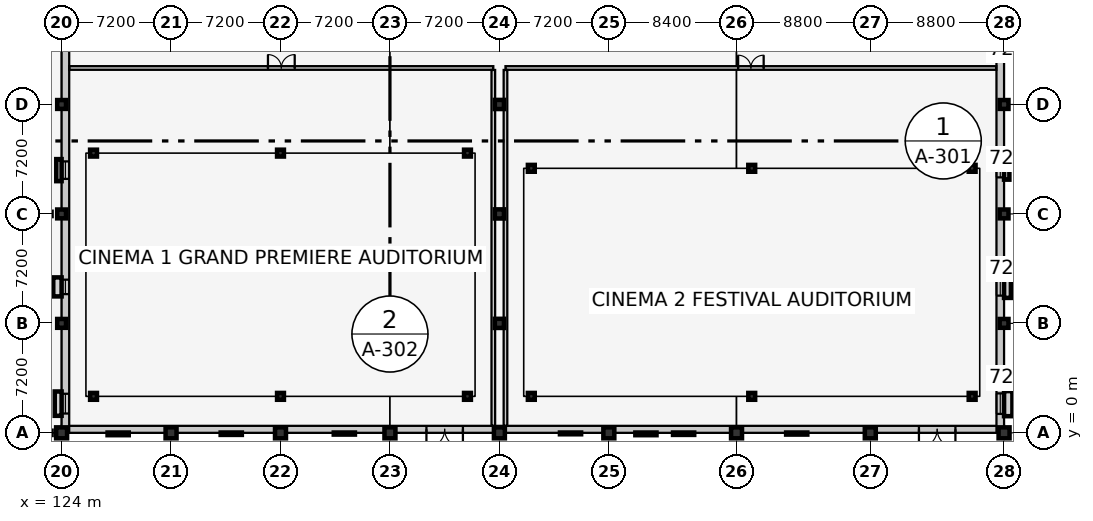
"""IFC4 building model, lengths in metres.
Left out: names, types, materials, properties, quantities, classifications, styles, units other than length and angle.
Written with IfcOpenShell. Run it as: python <this file> out.ifc"""

import sys

from ifc_helpers import new_model, si_unit, direction, frame, frame_2d, origin, origin_2d, place, context, subcontext, project, spatial, rectangle, extrude, element, fill, save


model = new_model("IFC4")
c1 = context("Model", 3, precision=1e-05, world=origin(), true_north=direction((0.0, 1.0)))
c2 = subcontext(c1, "Body", "Model", "MODEL_VIEW")
j1 = project(units=[si_unit("LENGTHUNIT", "METRE"), si_unit("PLANEANGLEUNIT", "RADIAN")], contexts=[c1])
p1 = place(None, origin())
s1 = spatial("IfcSite", under=j1, at=p1, CompositionType="ELEMENT")
p2 = place(p1, origin())
s2 = spatial("IfcBuilding", under=s1, at=p2, CompositionType="ELEMENT")
p3 = place(p2, origin())
s3 = spatial("IfcBuildingStorey", under=s2, at=p3, CompositionType="ELEMENT", Elevation=0.0)
p4 = place(p3, frame((124.0, 0.0, 0.0), z_axis=(0.0, 0.0, 1.0), x_axis=(1.0, 0.0, 0.0)))
e1 = element("IfcColumn", 1, at=p4, inside=s3, PredefinedType="COLUMN", context=c2, shape_type="SweptSolid", body=[
    extrude(rectangle(XDim=0.72, YDim=0.72, at=origin_2d()), origin(), (0.0, 0.0, 1.0), 5.4),
])
for number, where, z_axis, x_axis in (
    (2, (124.0, 7.2, 0.0), (0.0, 0.0, 1.0), (1.0, 0.0, 0.0)),
    (3, (124.0, 14.4, 0.0), (0.0, 0.0, 1.0), (1.0, 0.0, 0.0)),
    (4, (124.0, 21.6, 0.0), (0.0, 0.0, 1.0), (1.0, 0.0, 0.0)),
):
    element("IfcColumn", number, at=place(p3, frame(where, z_axis=z_axis, x_axis=x_axis)), inside=s3, PredefinedType="COLUMN", context=c2, shape_type="SweptSolid", body=[
        extrude(rectangle(XDim=0.58, YDim=0.58, at=origin_2d()), origin(), (0.0, 0.0, 1.0), 5.4),
    ])
for number, where, z_axis, x_axis in (
    (5, (131.2, 0.0, 0.0), (0.0, 0.0, 1.0), (1.0, 0.0, 0.0)),
    (6, (138.4, 0.0, 0.0), (0.0, 0.0, 1.0), (1.0, 0.0, 0.0)),
    (7, (145.6, 0.0, 0.0), (0.0, 0.0, 1.0), (1.0, 0.0, 0.0)),
    (8, (152.8, 0.0, 0.0), (0.0, 0.0, 1.0), (1.0, 0.0, 0.0)),
):
    element("IfcColumn", number, at=place(p3, frame(where, z_axis=z_axis, x_axis=x_axis)), inside=s3, PredefinedType="COLUMN", context=c2, shape_type="SweptSolid", body=[
        extrude(rectangle(XDim=0.72, YDim=0.72, at=origin_2d()), origin(), (0.0, 0.0, 1.0), 5.4),
    ])
for number, where, z_axis, x_axis in (
    (9, (152.8, 7.2, 0.0), (0.0, 0.0, 1.0), (1.0, 0.0, 0.0)),
    (10, (152.8, 14.4, 0.0), (0.0, 0.0, 1.0), (1.0, 0.0, 0.0)),
    (11, (152.8, 21.6, 0.0), (0.0, 0.0, 1.0), (1.0, 0.0, 0.0)),
):
    element("IfcColumn", number, at=place(p3, frame(where, z_axis=z_axis, x_axis=x_axis)), inside=s3, PredefinedType="COLUMN", context=c2, shape_type="SweptSolid", body=[
        extrude(rectangle(XDim=0.6, YDim=0.6, at=origin_2d()), origin(), (0.0, 0.0, 1.0), 5.4),
    ])
for number, where, z_axis, x_axis in (
    (12, (160.0, 0.0, 0.0), (0.0, 0.0, 1.0), (1.0, 0.0, 0.0)),
    (13, (168.4, 0.0, 0.0), (0.0, 0.0, 1.0), (1.0, 0.0, 0.0)),
    (14, (177.2, 0.0, 0.0), (0.0, 0.0, 1.0), (1.0, 0.0, 0.0)),
    (15, (186.0, 0.0, 0.0), (0.0, 0.0, 1.0), (1.0, 0.0, 0.0)),
):
    element("IfcColumn", number, at=place(p3, frame(where, z_axis=z_axis, x_axis=x_axis)), inside=s3, PredefinedType="COLUMN", context=c2, shape_type="SweptSolid", body=[
        extrude(rectangle(XDim=0.72, YDim=0.72, at=origin_2d()), origin(), (0.0, 0.0, 1.0), 5.4),
    ])
for number, where, z_axis, x_axis in (
    (16, (186.0, 7.2, 0.0), (0.0, 0.0, 1.0), (1.0, 0.0, 0.0)),
    (17, (186.0, 14.4, 0.0), (0.0, 0.0, 1.0), (1.0, 0.0, 0.0)),
    (18, (186.0, 21.6, 0.0), (0.0, 0.0, 1.0), (1.0, 0.0, 0.0)),
):
    element("IfcColumn", number, at=place(p3, frame(where, z_axis=z_axis, x_axis=x_axis)), inside=s3, PredefinedType="COLUMN", context=c2, shape_type="SweptSolid", body=[
        extrude(rectangle(XDim=0.58, YDim=0.58, at=origin_2d()), origin(), (0.0, 0.0, 1.0), 5.4),
    ])
p5 = place(p3, frame((126.1, 2.4, -0.55), z_axis=(0.0, 0.0, 1.0), x_axis=(1.0, 0.0, 0.0)))
e19 = element("IfcColumn", 19, at=p5, inside=s3, PredefinedType="COLUMN", context=c2, shape_type="SweptSolid", body=[
    extrude(rectangle(XDim=0.45, YDim=0.45, at=origin_2d()), origin(), (0.0, 0.0, 1.0), 0.925),
])
p6 = place(p3, frame((126.1, 18.4, -0.55), z_axis=(0.0, 0.0, 1.0), x_axis=(1.0, 0.0, 0.0)))
e20 = element("IfcColumn", 20, at=p6, inside=s3, PredefinedType="COLUMN", context=c2, shape_type="SweptSolid", body=[
    extrude(rectangle(XDim=0.45, YDim=0.45, at=origin_2d()), origin(), (0.0, 0.0, 1.0), 4.195),
])
p7 = place(p3, frame((138.4, 2.4, -0.55), z_axis=(0.0, 0.0, 1.0), x_axis=(1.0, 0.0, 0.0)))
e21 = element("IfcColumn", 21, at=p7, inside=s3, PredefinedType="COLUMN", context=c2, shape_type="SweptSolid", body=[
    extrude(rectangle(XDim=0.45, YDim=0.45, at=origin_2d()), origin(), (0.0, 0.0, 1.0), 0.925),
])
p8 = place(p3, frame((138.4, 18.4, -0.55), z_axis=(0.0, 0.0, 1.0), x_axis=(1.0, 0.0, 0.0)))
e22 = element("IfcColumn", 22, at=p8, inside=s3, PredefinedType="COLUMN", context=c2, shape_type="SweptSolid", body=[
    extrude(rectangle(XDim=0.45, YDim=0.45, at=origin_2d()), origin(), (0.0, 0.0, 1.0), 4.195),
])
p9 = place(p3, frame((150.7, 2.4, -0.55), z_axis=(0.0, 0.0, 1.0), x_axis=(1.0, 0.0, 0.0)))
e23 = element("IfcColumn", 23, at=p9, inside=s3, PredefinedType="COLUMN", context=c2, shape_type="SweptSolid", body=[
    extrude(rectangle(XDim=0.45, YDim=0.45, at=origin_2d()), origin(), (0.0, 0.0, 1.0), 0.925),
])
p10 = place(p3, frame((150.7, 18.4, -0.55), z_axis=(0.0, 0.0, 1.0), x_axis=(1.0, 0.0, 0.0)))
e24 = element("IfcColumn", 24, at=p10, inside=s3, PredefinedType="COLUMN", context=c2, shape_type="SweptSolid", body=[
    extrude(rectangle(XDim=0.45, YDim=0.45, at=origin_2d()), origin(), (0.0, 0.0, 1.0), 4.195),
])
p11 = place(p3, frame((154.9, 2.4, -0.55), z_axis=(0.0, 0.0, 1.0), x_axis=(1.0, 0.0, 0.0)))
e25 = element("IfcColumn", 25, at=p11, inside=s3, PredefinedType="COLUMN", context=c2, shape_type="SweptSolid", body=[
    extrude(rectangle(XDim=0.45, YDim=0.45, at=origin_2d()), origin(), (0.0, 0.0, 1.0), 0.945),
])
p12 = place(p3, frame((154.9, 17.4, -0.55), z_axis=(0.0, 0.0, 1.0), x_axis=(1.0, 0.0, 0.0)))
e26 = element("IfcColumn", 26, at=p12, inside=s3, PredefinedType="COLUMN", context=c2, shape_type="SweptSolid", body=[
    extrude(rectangle(XDim=0.45, YDim=0.45, at=origin_2d()), origin(), (0.0, 0.0, 1.0), 4.015),
])
p13 = place(p3, frame((169.4, 2.4, -0.55), z_axis=(0.0, 0.0, 1.0), x_axis=(1.0, 0.0, 0.0)))
e27 = element("IfcColumn", 27, at=p13, inside=s3, PredefinedType="COLUMN", context=c2, shape_type="SweptSolid", body=[
    extrude(rectangle(XDim=0.45, YDim=0.45, at=origin_2d()), origin(), (0.0, 0.0, 1.0), 0.945),
])
p14 = place(p3, frame((169.4, 17.4, -0.55), z_axis=(0.0, 0.0, 1.0), x_axis=(1.0, 0.0, 0.0)))
e28 = element("IfcColumn", 28, at=p14, inside=s3, PredefinedType="COLUMN", context=c2, shape_type="SweptSolid", body=[
    extrude(rectangle(XDim=0.45, YDim=0.45, at=origin_2d()), origin(), (0.0, 0.0, 1.0), 4.015),
])
p15 = place(p3, frame((183.9, 2.4, -0.55), z_axis=(0.0, 0.0, 1.0), x_axis=(1.0, 0.0, 0.0)))
e29 = element("IfcColumn", 29, at=p15, inside=s3, PredefinedType="COLUMN", context=c2, shape_type="SweptSolid", body=[
    extrude(rectangle(XDim=0.45, YDim=0.45, at=origin_2d()), origin(), (0.0, 0.0, 1.0), 0.945),
])
p16 = place(p3, frame((183.9, 17.4, -0.55), z_axis=(0.0, 0.0, 1.0), x_axis=(1.0, 0.0, 0.0)))
e30 = element("IfcColumn", 30, at=p16, inside=s3, PredefinedType="COLUMN", context=c2, shape_type="SweptSolid", body=[
    extrude(rectangle(XDim=0.45, YDim=0.45, at=origin_2d()), origin(), (0.0, 0.0, 1.0), 4.015),
])
p17 = place(p3, frame((186.0, 0.23, 0.0), z_axis=(0.0, 0.0, 1.0), x_axis=(-1.0, 0.0, 0.0)))
e31 = element("IfcWall", 31, at=p17, inside=s3, PredefinedType="SOLIDWALL", context=c2, shape_type="SweptSolid", body=[
    extrude(rectangle(XDim=62.0, YDim=0.46, at=frame_2d((31.0, 0.0))), origin(), (0.0, 0.0, 1.0), 5.4),
])
p18 = place(p17, frame((35.6, 0.0, 0.0)))
e32 = element("IfcOpeningElement", 32, at=p18, cuts=e31, PredefinedType="OPENING", context=c2, shape_type="SweptSolid", body=[
    extrude(rectangle(XDim=2.4, YDim=2.4, at=frame_2d((1.2, 1.2))), frame((0.0, 0.242, 0.0), z_axis=(0.0, -1.0, 0.0), x_axis=(1.0, 0.0, 0.0)), (0.0, 0.0, 1.0), 0.484),
])
p19 = place(p17, frame((3.2, 0.0, 0.0)))
e33 = element("IfcOpeningElement", 33, at=p19, cuts=e31, PredefinedType="OPENING", context=c2, shape_type="SweptSolid", body=[
    extrude(rectangle(XDim=2.4, YDim=2.4, at=frame_2d((1.2, 1.2))), frame((0.0, 0.242, 0.0), z_axis=(0.0, -1.0, 0.0), x_axis=(1.0, 0.0, 0.0)), (0.0, 0.0, 1.0), 0.484),
])
p20 = place(p3, frame((185.75, 38.4, 0.0), z_axis=(0.0, 0.0, 1.0), x_axis=(0.0, -1.0, 0.0)))
e34 = element("IfcWall", 34, at=p20, inside=s3, PredefinedType="SOLIDWALL", context=c2, shape_type="SweptSolid", body=[
    extrude(rectangle(XDim=38.4, YDim=0.5, at=frame_2d((19.2, 0.0))), origin(), (0.0, 0.0, 1.0), 4.275),
])
p21 = place(p20, frame((1.42, 0.0, 0.9)))
e35 = element("IfcOpeningElement", 35, at=p21, cuts=e34, PredefinedType="OPENING", context=c2, shape_type="SweptSolid", body=[
    extrude(rectangle(XDim=1.0, YDim=1.35, at=frame_2d((0.5, 0.675))), frame((0.0, 0.262, 0.0), z_axis=(0.0, -1.0, 0.0), x_axis=(1.0, 0.0, 0.0)), (0.0, 0.0, 1.0), 0.524),
])
p22 = place(p20, frame((5.21, 0.0, 0.9)))
e36 = element("IfcOpeningElement", 36, at=p22, cuts=e34, PredefinedType="OPENING", context=c2, shape_type="SweptSolid", body=[
    extrude(rectangle(XDim=1.1, YDim=1.35, at=frame_2d((0.55, 0.675))), frame((0.0, 0.262, 0.0), z_axis=(0.0, -1.0, 0.0), x_axis=(1.0, 0.0, 0.0)), (0.0, 0.0, 1.0), 0.524),
])
p23 = place(p20, frame((20.645, 0.0, 0.9)))
e37 = element("IfcOpeningElement", 37, at=p23, cuts=e34, PredefinedType="OPENING", context=c2, shape_type="SweptSolid", body=[
    extrude(rectangle(XDim=0.95, YDim=1.45, at=frame_2d((0.475, 0.725))), frame((0.0, 0.262, 0.0), z_axis=(0.0, -1.0, 0.0), x_axis=(1.0, 0.0, 0.0)), (0.0, 0.0, 1.0), 0.524),
])
p24 = place(p20, frame((28.225, 0.0, 0.9)))
e38 = element("IfcOpeningElement", 38, at=p24, cuts=e34, PredefinedType="OPENING", context=c2, shape_type="SweptSolid", body=[
    extrude(rectangle(XDim=1.15, YDim=1.45, at=frame_2d((0.575, 0.725))), frame((0.0, 0.262, 0.0), z_axis=(0.0, -1.0, 0.0), x_axis=(1.0, 0.0, 0.0)), (0.0, 0.0, 1.0), 0.524),
])
p25 = place(p20, frame((35.805, 0.0, 0.9)))
e39 = element("IfcOpeningElement", 39, at=p25, cuts=e34, PredefinedType="OPENING", context=c2, shape_type="SweptSolid", body=[
    extrude(rectangle(XDim=1.35, YDim=1.45, at=frame_2d((0.675, 0.725))), frame((0.0, 0.262, 0.0), z_axis=(0.0, -1.0, 0.0), x_axis=(1.0, 0.0, 0.0)), (0.0, 0.0, 1.0), 0.524),
])
p26 = place(p3, frame((124.25, 0.0, 0.0), z_axis=(0.0, 0.0, 1.0), x_axis=(0.0, 1.0, 0.0)))
e40 = element("IfcWall", 40, at=p26, inside=s3, PredefinedType="SOLIDWALL", context=c2, shape_type="SweptSolid", body=[
    extrude(rectangle(XDim=38.4, YDim=0.5, at=frame_2d((19.2, 0.0))), origin(), (0.0, 0.0, 1.0), 4.275),
])
p27 = place(p26, frame((25.3, 0.0, 0.0)))
e41 = element("IfcOpeningElement", 41, at=p27, cuts=e40, PredefinedType="OPENING", context=c2, shape_type="SweptSolid", body=[
    extrude(rectangle(XDim=2.2, YDim=2.4, at=frame_2d((1.1, 1.2))), frame((0.0, 0.262, 0.0), z_axis=(0.0, -1.0, 0.0), x_axis=(1.0, 0.0, 0.0)), (0.0, 0.0, 1.0), 0.524),
])
p28 = place(p26, frame((1.27, 0.0, 0.9)))
e42 = element("IfcOpeningElement", 42, at=p28, cuts=e40, PredefinedType="OPENING", context=c2, shape_type="SweptSolid", body=[
    extrude(rectangle(XDim=1.3, YDim=1.35, at=frame_2d((0.65, 0.675))), frame((0.0, 0.262, 0.0), z_axis=(0.0, -1.0, 0.0), x_axis=(1.0, 0.0, 0.0)), (0.0, 0.0, 1.0), 0.524),
])
p29 = place(p26, frame((9.125, 0.0, 0.9)))
e43 = element("IfcOpeningElement", 43, at=p29, cuts=e40, PredefinedType="OPENING", context=c2, shape_type="SweptSolid", body=[
    extrude(rectangle(XDim=0.95, YDim=1.45, at=frame_2d((0.475, 0.725))), frame((0.0, 0.262, 0.0), z_axis=(0.0, -1.0, 0.0), x_axis=(1.0, 0.0, 0.0)), (0.0, 0.0, 1.0), 0.524),
])
p30 = place(p26, frame((16.705, 0.0, 0.9)))
e44 = element("IfcOpeningElement", 44, at=p30, cuts=e40, PredefinedType="OPENING", context=c2, shape_type="SweptSolid", body=[
    extrude(rectangle(XDim=1.15, YDim=1.45, at=frame_2d((0.575, 0.725))), frame((0.0, 0.262, 0.0), z_axis=(0.0, -1.0, 0.0), x_axis=(1.0, 0.0, 0.0)), (0.0, 0.0, 1.0), 0.524),
])
p31 = place(p26, frame((32.19, 0.0, 0.9)))
e45 = element("IfcOpeningElement", 45, at=p31, cuts=e40, PredefinedType="OPENING", context=c2, shape_type="SweptSolid", body=[
    extrude(rectangle(XDim=0.9, YDim=1.6, at=frame_2d((0.45, 0.8))), frame((0.0, 0.262, 0.0), z_axis=(0.0, -1.0, 0.0), x_axis=(1.0, 0.0, 0.0)), (0.0, 0.0, 1.0), 0.524),
])
p32 = place(p26, frame((35.955, 0.0, 0.9)))
e46 = element("IfcOpeningElement", 46, at=p32, cuts=e40, PredefinedType="OPENING", context=c2, shape_type="SweptSolid", body=[
    extrude(rectangle(XDim=1.05, YDim=1.6, at=frame_2d((0.525, 0.8))), frame((0.0, 0.262, 0.0), z_axis=(0.0, -1.0, 0.0), x_axis=(1.0, 0.0, 0.0)), (0.0, 0.0, 1.0), 0.524),
])
p33 = place(p3, frame((124.51, 24.0, 0.0), z_axis=(0.0, 0.0, 1.0), x_axis=(1.0, 0.0, 0.0)))
e47 = element("IfcWall", 47, at=p33, inside=s3, PredefinedType="PARTITIONING", context=c2, shape_type="SweptSolid", body=[
    extrude(rectangle(XDim=27.89, YDim=0.24, at=frame_2d((13.945, 0.0))), origin(), (0.0, 0.0, 1.0), 5.15),
])
p34 = place(p33, frame((13.065, 0.0, 0.0)))
e48 = element("IfcOpeningElement", 48, at=p34, cuts=e47, PredefinedType="OPENING", context=c2, shape_type="SweptSolid", body=[
    extrude(rectangle(XDim=1.76, YDim=2.3, at=frame_2d((0.88, 1.15))), frame((0.0, 0.132, 0.0), z_axis=(0.0, -1.0, 0.0), x_axis=(1.0, 0.0, 0.0)), (0.0, 0.0, 1.0), 0.264),
])
p35 = place(p3, frame((152.4, 0.47, 0.0), z_axis=(0.0, 0.0, 1.0), x_axis=(0.0, 1.0, 0.0)))
e49 = element("IfcWall", 49, at=p35, inside=s3, PredefinedType="PARTITIONING", context=c2, shape_type="SweptSolid", body=[
    extrude(rectangle(XDim=23.4, YDim=0.24, at=frame_2d((11.7, 0.0))), origin(), (0.0, 0.0, 1.0), 5.15),
])
p36 = place(p3, frame((153.2, 24.0, 0.0), z_axis=(0.0, 0.0, 1.0), x_axis=(1.0, 0.0, 0.0)))
e50 = element("IfcWall", 50, at=p36, inside=s3, PredefinedType="PARTITIONING", context=c2, shape_type="SweptSolid", body=[
    extrude(rectangle(XDim=32.29, YDim=0.24, at=frame_2d((16.145, 0.0))), origin(), (0.0, 0.0, 1.0), 5.15),
])
p37 = place(p36, frame((15.305, 0.0, 0.0)))
e51 = element("IfcOpeningElement", 51, at=p37, cuts=e50, PredefinedType="OPENING", context=c2, shape_type="SweptSolid", body=[
    extrude(rectangle(XDim=1.68, YDim=2.3, at=frame_2d((0.84, 1.15))), frame((0.0, 0.132, 0.0), z_axis=(0.0, -1.0, 0.0), x_axis=(1.0, 0.0, 0.0)), (0.0, 0.0, 1.0), 0.264),
])
p38 = place(p3, frame((153.2, 0.47, 0.0), z_axis=(0.0, 0.0, 1.0), x_axis=(0.0, 1.0, 0.0)))
e52 = element("IfcWall", 52, at=p38, inside=s3, PredefinedType="PARTITIONING", context=c2, shape_type="SweptSolid", body=[
    extrude(rectangle(XDim=23.4, YDim=0.24, at=frame_2d((11.7, 0.0))), origin(), (0.0, 0.0, 1.0), 5.15),
])
p39 = place(p18, origin())
e53 = element("IfcDoor", 53, at=p39, inside=s3, OperationType="DOUBLE_DOOR_SINGLE_SWING", PredefinedType="DOOR", context=c2, shape_type="SweptSolid", body=[
    extrude(rectangle(XDim=2.4, YDim=2.4, at=frame_2d((1.2, 1.2))), frame((0.0, 0.025, 0.0), z_axis=(0.0, -1.0, 0.0), x_axis=(1.0, 0.0, 0.0)), (0.0, 0.0, 1.0), 0.05),
])
fill(e32, e53)
p40 = place(p19, origin())
e54 = element("IfcDoor", 54, at=p40, inside=s3, OperationType="DOUBLE_DOOR_SINGLE_SWING", PredefinedType="DOOR", context=c2, shape_type="SweptSolid", body=[
    extrude(rectangle(XDim=2.4, YDim=2.4, at=frame_2d((1.2, 1.2))), frame((0.0, 0.025, 0.0), z_axis=(0.0, -1.0, 0.0), x_axis=(1.0, 0.0, 0.0)), (0.0, 0.0, 1.0), 0.05),
])
fill(e33, e54)
p41 = place(p23, origin())
e55 = element("IfcWindow", 55, at=p41, inside=s3, PartitioningType="SINGLE_PANEL", PredefinedType="WINDOW", context=c2, shape_type="SweptSolid", body=[
    extrude(rectangle(XDim=0.95, YDim=1.45, at=frame_2d((0.475, 0.725))), frame((0.0, 0.03, 0.0), z_axis=(0.0, -1.0, 0.0), x_axis=(1.0, 0.0, 0.0)), (0.0, 0.0, 1.0), 0.06),
])
fill(e37, e55)
p42 = place(p24, origin())
e56 = element("IfcWindow", 56, at=p42, inside=s3, PartitioningType="SINGLE_PANEL", PredefinedType="WINDOW", context=c2, shape_type="SweptSolid", body=[
    extrude(rectangle(XDim=1.15, YDim=1.45, at=frame_2d((0.575, 0.725))), frame((0.0, 0.03, 0.0), z_axis=(0.0, -1.0, 0.0), x_axis=(1.0, 0.0, 0.0)), (0.0, 0.0, 1.0), 0.06),
])
fill(e38, e56)
p43 = place(p25, origin())
e57 = element("IfcWindow", 57, at=p43, inside=s3, PartitioningType="SINGLE_PANEL", PredefinedType="WINDOW", context=c2, shape_type="SweptSolid", body=[
    extrude(rectangle(XDim=1.35, YDim=1.45, at=frame_2d((0.675, 0.725))), frame((0.0, 0.03, 0.0), z_axis=(0.0, -1.0, 0.0), x_axis=(1.0, 0.0, 0.0)), (0.0, 0.0, 1.0), 0.06),
])
fill(e39, e57)
p44 = place(p28, origin())
e58 = element("IfcWindow", 58, at=p44, inside=s3, PartitioningType="SINGLE_PANEL", PredefinedType="WINDOW", context=c2, shape_type="SweptSolid", body=[
    extrude(rectangle(XDim=1.3, YDim=1.35, at=frame_2d((0.65, 0.675))), frame((0.0, 0.03, 0.0), z_axis=(0.0, -1.0, 0.0), x_axis=(1.0, 0.0, 0.0)), (0.0, 0.0, 1.0), 0.06),
])
fill(e42, e58)
p45 = place(p29, origin())
e59 = element("IfcWindow", 59, at=p45, inside=s3, PartitioningType="SINGLE_PANEL", PredefinedType="WINDOW", context=c2, shape_type="SweptSolid", body=[
    extrude(rectangle(XDim=0.95, YDim=1.45, at=frame_2d((0.475, 0.725))), frame((0.0, 0.03, 0.0), z_axis=(0.0, -1.0, 0.0), x_axis=(1.0, 0.0, 0.0)), (0.0, 0.0, 1.0), 0.06),
])
fill(e43, e59)
p46 = place(p30, origin())
e60 = element("IfcWindow", 60, at=p46, inside=s3, PartitioningType="SINGLE_PANEL", PredefinedType="WINDOW", context=c2, shape_type="SweptSolid", body=[
    extrude(rectangle(XDim=1.15, YDim=1.45, at=frame_2d((0.575, 0.725))), frame((0.0, 0.03, 0.0), z_axis=(0.0, -1.0, 0.0), x_axis=(1.0, 0.0, 0.0)), (0.0, 0.0, 1.0), 0.06),
])
fill(e44, e60)
p47 = place(p34, origin())
e61 = element("IfcDoor", 61, at=p47, inside=s3, OperationType="DOUBLE_DOOR_SINGLE_SWING", PredefinedType="DOOR", context=c2, shape_type="SweptSolid", body=[
    extrude(rectangle(XDim=1.76, YDim=2.3, at=frame_2d((0.88, 1.15))), frame((0.0, 0.025, 0.0), z_axis=(0.0, -1.0, 0.0), x_axis=(1.0, 0.0, 0.0)), (0.0, 0.0, 1.0), 0.05),
])
fill(e48, e61)
p48 = place(p37, origin())
e62 = element("IfcDoor", 62, at=p48, inside=s3, OperationType="DOUBLE_DOOR_SINGLE_SWING", PredefinedType="DOOR", context=c2, shape_type="SweptSolid", body=[
    extrude(rectangle(XDim=1.68, YDim=2.3, at=frame_2d((0.84, 1.15))), frame((0.0, 0.025, 0.0), z_axis=(0.0, -1.0, 0.0), x_axis=(1.0, 0.0, 0.0)), (0.0, 0.0, 1.0), 0.05),
])
fill(e51, e62)
save(model, sys.argv[1])
